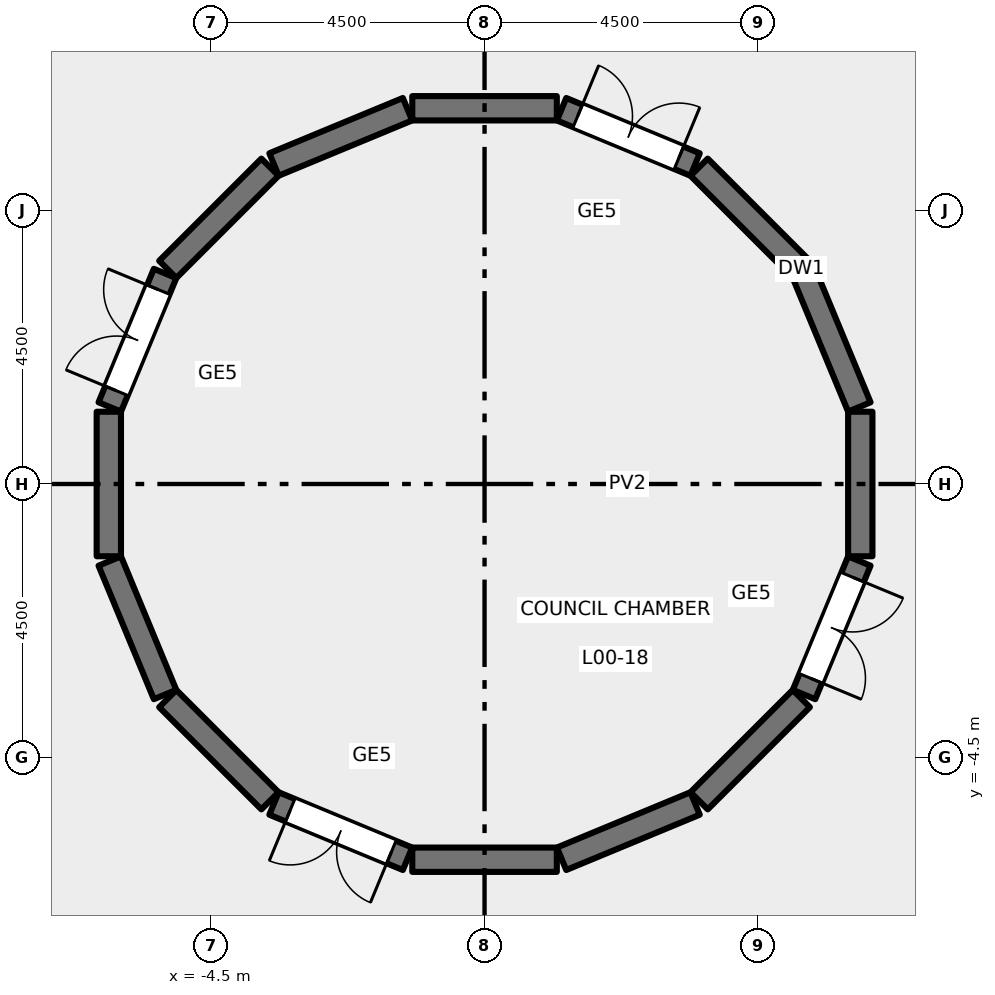
"""IFC4 building model, lengths in metres.
Left out: names, types, materials, properties, quantities, classifications, styles, units other than length and angle.
Written with IfcOpenShell. Run it as: python <this file> out.ifc"""

import sys

from ifc_helpers import new_model, si_unit, direction, frame, frame_2d, origin, place, context, subcontext, project, spatial, rectangle, extrude, element, fill, save


model = new_model("IFC4")
c1 = context("Model", 3, precision=1e-05, world=origin(), true_north=direction((0.0, 1.0)))
c2 = subcontext(c1, "Body", "Model", "MODEL_VIEW")
j1 = project(units=[si_unit("LENGTHUNIT", "METRE"), si_unit("PLANEANGLEUNIT", "RADIAN")], contexts=[c1])
p1 = place(None, origin())
s1 = spatial("IfcSite", under=j1, at=p1, CompositionType="ELEMENT")
p2 = place(p1, origin())
s2 = spatial("IfcBuilding", under=s1, at=p2, CompositionType="ELEMENT")
p3 = place(p2, origin())
s3 = spatial("IfcBuildingStorey", under=s2, at=p3, CompositionType="ELEMENT", Elevation=0.0)
p4 = place(p3, frame((6.163, 1.267, 0.0), z_axis=(0.0, 0.0, 1.0), x_axis=(-0.382681453552, 0.92388035216, 0.0)))
e1 = element("IfcWall", 1, at=p4, inside=s3, PredefinedType="SOLIDWALL", context=c2, shape_type="SweptSolid", body=[
    extrude(rectangle(XDim=2.376, YDim=0.4, at=frame_2d((1.188, 0.0))), origin(), (0.0, 0.0, 1.0), 7.2),
])
p5 = place(p3, frame((5.209, 3.529, 0.0), z_axis=(0.0, 0.0, 1.0), x_axis=(-0.707106781187, 0.707106781187, 0.0)))
e2 = element("IfcWall", 2, at=p5, inside=s3, PredefinedType="SOLIDWALL", context=c2, shape_type="SweptSolid", body=[
    extrude(rectangle(XDim=2.377, YDim=0.4, at=frame_2d((1.188, 0.0))), origin(), (0.0, 0.0, 1.0), 7.2),
])
p6 = place(p3, frame((3.462, 5.254, 0.0), z_axis=(0.0, 0.0, 1.0), x_axis=(-0.92388035216, 0.382681453552, 0.0)))
e3 = element("IfcWall", 3, at=p6, inside=s3, PredefinedType="SOLIDWALL", context=c2, shape_type="SweptSolid", body=[
    extrude(rectangle(XDim=2.376, YDim=0.4, at=frame_2d((1.188, 0.0))), origin(), (0.0, 0.0, 1.0), 7.2),
])
p7 = place(p6, frame((0.288, 0.0, 0.0)))
e4 = element("IfcOpeningElement", 4, at=p7, cuts=e3, PredefinedType="OPENING", context=c2, shape_type="SweptSolid", body=[
    extrude(rectangle(XDim=1.8, YDim=2.4, at=frame_2d((0.9, 1.2))), frame((0.0, 0.21, 0.0), z_axis=(0.0, -1.0, 0.0), x_axis=(1.0, 0.0, 0.0)), (0.0, 0.0, 1.0), 0.42),
])
for number, where, z_axis, x_axis in (
    (5, (1.188, 6.179, 0.0), (0.0, 0.0, 1.0), (-1.0, 0.0, 0.0)),
    (6, (-1.267, 6.163, 0.0), (0.0, 0.0, 1.0), (-0.924, -0.383, 0.0)),
):
    element("IfcWall", number, at=place(p3, frame(where, z_axis=z_axis, x_axis=x_axis)), inside=s3, PredefinedType="SOLIDWALL", context=c2, shape_type="SweptSolid", body=[
        extrude(rectangle(XDim=2.376, YDim=0.4, at=frame_2d((1.188, 0.0))), origin(), (0.0, 0.0, 1.0), 7.2),
    ])
p8 = place(p3, frame((-3.529, 5.209, 0.0), z_axis=(0.0, 0.0, 1.0), x_axis=(-0.707106781187, -0.707106781187, 0.0)))
e7 = element("IfcWall", 7, at=p8, inside=s3, PredefinedType="SOLIDWALL", context=c2, shape_type="SweptSolid", body=[
    extrude(rectangle(XDim=2.377, YDim=0.4, at=frame_2d((1.188, 0.0))), origin(), (0.0, 0.0, 1.0), 7.2),
])
p9 = place(p3, frame((-5.254, 3.462, 0.0), z_axis=(0.0, 0.0, 1.0), x_axis=(-0.382681453552, -0.92388035216, 0.0)))
e8 = element("IfcWall", 8, at=p9, inside=s3, PredefinedType="SOLIDWALL", context=c2, shape_type="SweptSolid", body=[
    extrude(rectangle(XDim=2.376, YDim=0.4, at=frame_2d((1.188, 0.0))), origin(), (0.0, 0.0, 1.0), 7.2),
])
p10 = place(p9, frame((0.288, 0.0, 0.0)))
e9 = element("IfcOpeningElement", 9, at=p10, cuts=e8, PredefinedType="OPENING", context=c2, shape_type="SweptSolid", body=[
    extrude(rectangle(XDim=1.8, YDim=2.4, at=frame_2d((0.9, 1.2))), frame((0.0, 0.21, 0.0), z_axis=(0.0, -1.0, 0.0), x_axis=(1.0, 0.0, 0.0)), (0.0, 0.0, 1.0), 0.42),
])
for number, where, z_axis, x_axis in (
    (10, (-6.179, 1.188, 0.0), (0.0, 0.0, 1.0), (0.0, -1.0, 0.0)),
    (11, (-6.163, -1.267, 0.0), (0.0, 0.0, 1.0), (0.383, -0.924, 0.0)),
):
    element("IfcWall", number, at=place(p3, frame(where, z_axis=z_axis, x_axis=x_axis)), inside=s3, PredefinedType="SOLIDWALL", context=c2, shape_type="SweptSolid", body=[
        extrude(rectangle(XDim=2.376, YDim=0.4, at=frame_2d((1.188, 0.0))), origin(), (0.0, 0.0, 1.0), 7.2),
    ])
p11 = place(p3, frame((-5.209, -3.529, 0.0), z_axis=(0.0, 0.0, 1.0), x_axis=(0.707106781187, -0.707106781187, 0.0)))
e12 = element("IfcWall", 12, at=p11, inside=s3, PredefinedType="SOLIDWALL", context=c2, shape_type="SweptSolid", body=[
    extrude(rectangle(XDim=2.377, YDim=0.4, at=frame_2d((1.188, 0.0))), origin(), (0.0, 0.0, 1.0), 7.2),
])
p12 = place(p3, frame((-3.462, -5.254, 0.0), z_axis=(0.0, 0.0, 1.0), x_axis=(0.92388035216, -0.382681453552, 0.0)))
e13 = element("IfcWall", 13, at=p12, inside=s3, PredefinedType="SOLIDWALL", context=c2, shape_type="SweptSolid", body=[
    extrude(rectangle(XDim=2.376, YDim=0.4, at=frame_2d((1.188, 0.0))), origin(), (0.0, 0.0, 1.0), 7.2),
])
p13 = place(p12, frame((0.288, 0.0, 0.0)))
e14 = element("IfcOpeningElement", 14, at=p13, cuts=e13, PredefinedType="OPENING", context=c2, shape_type="SweptSolid", body=[
    extrude(rectangle(XDim=1.8, YDim=2.4, at=frame_2d((0.9, 1.2))), frame((0.0, 0.21, 0.0), z_axis=(0.0, -1.0, 0.0), x_axis=(1.0, 0.0, 0.0)), (0.0, 0.0, 1.0), 0.42),
])
for number, where, z_axis, x_axis in (
    (15, (-1.188, -6.179, 0.0), (0.0, 0.0, 1.0), (1.0, 0.0, 0.0)),
    (16, (1.267, -6.163, 0.0), (0.0, 0.0, 1.0), (0.924, 0.383, 0.0)),
):
    element("IfcWall", number, at=place(p3, frame(where, z_axis=z_axis, x_axis=x_axis)), inside=s3, PredefinedType="SOLIDWALL", context=c2, shape_type="SweptSolid", body=[
        extrude(rectangle(XDim=2.376, YDim=0.4, at=frame_2d((1.188, 0.0))), origin(), (0.0, 0.0, 1.0), 7.2),
    ])
p14 = place(p3, frame((3.529, -5.209, 0.0), z_axis=(0.0, 0.0, 1.0), x_axis=(0.707106781187, 0.707106781187, 0.0)))
e17 = element("IfcWall", 17, at=p14, inside=s3, PredefinedType="SOLIDWALL", context=c2, shape_type="SweptSolid", body=[
    extrude(rectangle(XDim=2.377, YDim=0.4, at=frame_2d((1.188, 0.0))), origin(), (0.0, 0.0, 1.0), 7.2),
])
p15 = place(p3, frame((5.254, -3.462, 0.0), z_axis=(0.0, 0.0, 1.0), x_axis=(0.382681453552, 0.92388035216, 0.0)))
e18 = element("IfcWall", 18, at=p15, inside=s3, PredefinedType="SOLIDWALL", context=c2, shape_type="SweptSolid", body=[
    extrude(rectangle(XDim=2.376, YDim=0.4, at=frame_2d((1.188, 0.0))), origin(), (0.0, 0.0, 1.0), 7.2),
])
p16 = place(p15, frame((0.288, 0.0, 0.0)))
e19 = element("IfcOpeningElement", 19, at=p16, cuts=e18, PredefinedType="OPENING", context=c2, shape_type="SweptSolid", body=[
    extrude(rectangle(XDim=1.8, YDim=2.4, at=frame_2d((0.9, 1.2))), frame((0.0, 0.21, 0.0), z_axis=(0.0, -1.0, 0.0), x_axis=(1.0, 0.0, 0.0)), (0.0, 0.0, 1.0), 0.42),
])
p17 = place(p3, frame((6.179, -1.188, 0.0), z_axis=(0.0, 0.0, 1.0), x_axis=(0.0, 1.0, 0.0)))
e20 = element("IfcWall", 20, at=p17, inside=s3, PredefinedType="SOLIDWALL", context=c2, shape_type="SweptSolid", body=[
    extrude(rectangle(XDim=2.376, YDim=0.4, at=frame_2d((1.188, 0.0))), origin(), (0.0, 0.0, 1.0), 7.2),
])
p18 = place(p7, frame((1.8, 0.0, 0.0), z_axis=(0.0, 0.0, 1.0), x_axis=(-1.0, 0.0, 0.0)))
e21 = element("IfcDoor", 21, at=p18, inside=s3, OperationType="DOUBLE_DOOR_SINGLE_SWING", PredefinedType="DOOR", context=c2, shape_type="SweptSolid", body=[
    extrude(rectangle(XDim=1.8, YDim=2.4, at=frame_2d((0.9, 1.2))), frame((0.0, 0.025, 0.0), z_axis=(0.0, -1.0, 0.0), x_axis=(1.0, 0.0, 0.0)), (0.0, 0.0, 1.0), 0.05),
])
fill(e4, e21)
p19 = place(p10, frame((1.8, 0.0, 0.0), z_axis=(0.0, 0.0, 1.0), x_axis=(-1.0, 0.0, 0.0)))
e22 = element("IfcDoor", 22, at=p19, inside=s3, OperationType="DOUBLE_DOOR_SINGLE_SWING", PredefinedType="DOOR", context=c2, shape_type="SweptSolid", body=[
    extrude(rectangle(XDim=1.8, YDim=2.4, at=frame_2d((0.9, 1.2))), frame((0.0, 0.025, 0.0), z_axis=(0.0, -1.0, 0.0), x_axis=(1.0, 0.0, 0.0)), (0.0, 0.0, 1.0), 0.05),
])
fill(e9, e22)
p20 = place(p13, frame((1.8, 0.0, 0.0), z_axis=(0.0, 0.0, 1.0), x_axis=(-1.0, 0.0, 0.0)))
e23 = element("IfcDoor", 23, at=p20, inside=s3, OperationType="DOUBLE_DOOR_SINGLE_SWING", PredefinedType="DOOR", context=c2, shape_type="SweptSolid", body=[
    extrude(rectangle(XDim=1.8, YDim=2.4, at=frame_2d((0.9, 1.2))), frame((0.0, 0.025, 0.0), z_axis=(0.0, -1.0, 0.0), x_axis=(1.0, 0.0, 0.0)), (0.0, 0.0, 1.0), 0.05),
])
fill(e14, e23)
p21 = place(p16, frame((1.8, 0.0, 0.0), z_axis=(0.0, 0.0, 1.0), x_axis=(-1.0, 0.0, 0.0)))
e24 = element("IfcDoor", 24, at=p21, inside=s3, OperationType="DOUBLE_DOOR_SINGLE_SWING", PredefinedType="DOOR", context=c2, shape_type="SweptSolid", body=[
    extrude(rectangle(XDim=1.8, YDim=2.4, at=frame_2d((0.9, 1.2))), frame((0.0, 0.025, 0.0), z_axis=(0.0, -1.0, 0.0), x_axis=(1.0, 0.0, 0.0)), (0.0, 0.0, 1.0), 0.05),
])
fill(e19, e24)
save(model, sys.argv[1])
